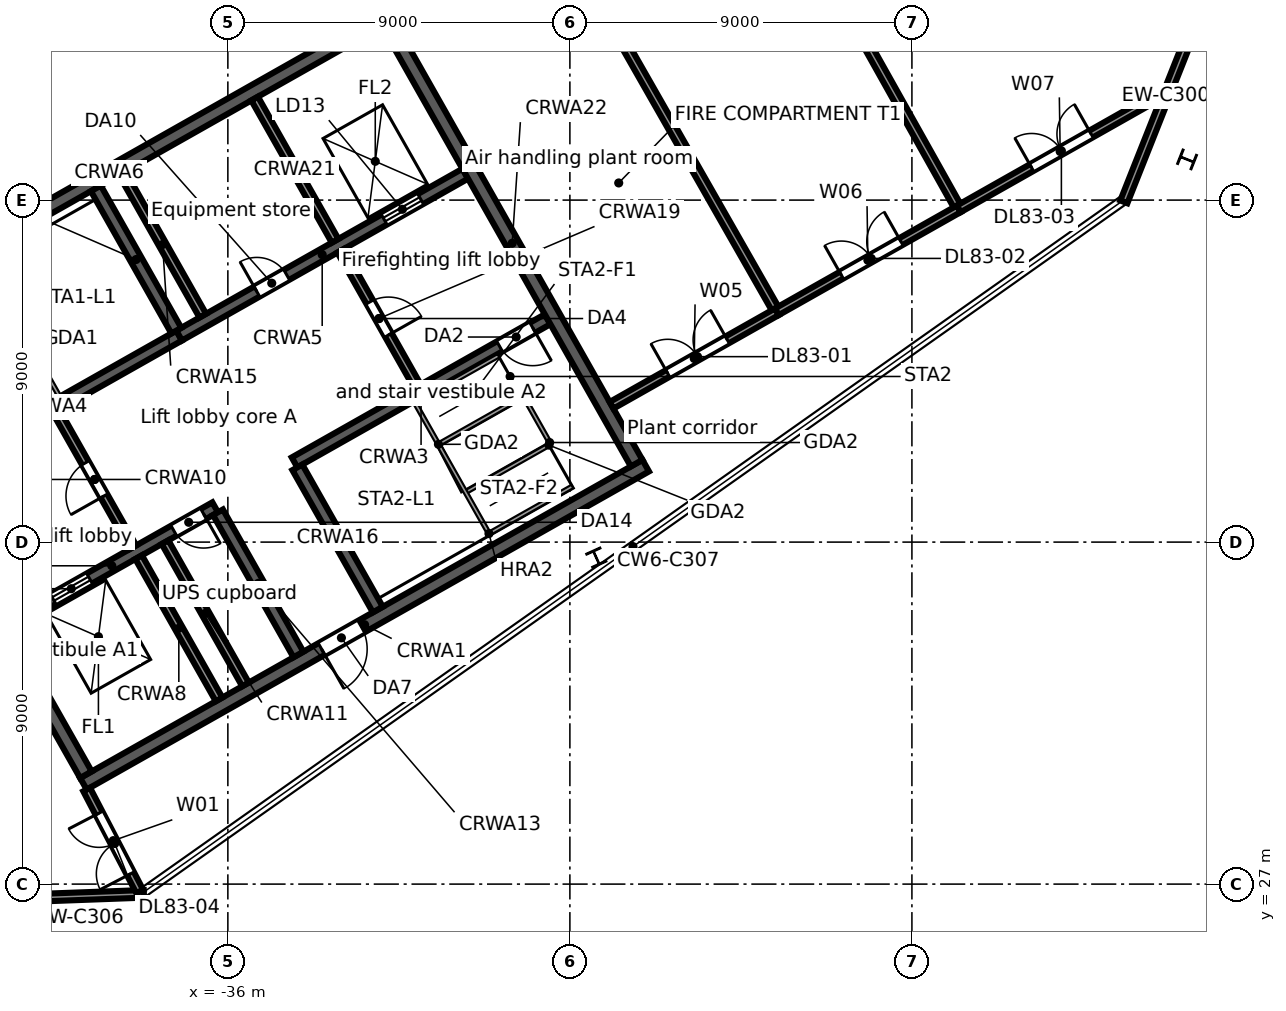
"""IFC4 building model, lengths in metres.
Left out: names, types, materials, properties, quantities, classifications, styles, units other than length and angle.
Written with IfcOpenShell. Run it as: python <this file> out.ifc"""

import sys

from ifc_helpers import new_model, si_unit, direction, frame, frame_2d, origin, origin_2d, place, context, subcontext, project, spatial, rectangle, i_section, extrude, element, fill, save


model = new_model("IFC4")
c1 = context("Model", 3, precision=1e-05, world=origin(), true_north=direction((0.0, 1.0)))
c2 = subcontext(c1, "Body", "Model", "MODEL_VIEW")
j1 = project(units=[si_unit("LENGTHUNIT", "METRE"), si_unit("PLANEANGLEUNIT", "RADIAN")], contexts=[c1])
p1 = place(None, origin())
s1 = spatial("IfcSite", under=j1, at=p1, CompositionType="ELEMENT")
p2 = place(p1, origin())
s2 = spatial("IfcBuilding", under=s1, at=p2, CompositionType="ELEMENT")
p3 = place(p2, frame((0.0, 0.0, 364.9)))
s3 = spatial("IfcBuildingStorey", under=s2, at=p3, CompositionType="ELEMENT", Elevation=364.9)
for number, where, z_axis, x_axis in (
    (1, (-10.76, 46.071, 0.0), (0.0, 0.0, 1.0), (0.369, 0.929, 0.0)),
    (2, (-26.305, 35.591, 0.0), (0.0, 0.0, 1.0), (0.911, 0.413, 0.0)),
):
    element("IfcColumn", number, at=place(p3, frame(where, z_axis=z_axis, x_axis=x_axis)), inside=s3, PredefinedType="COLUMN", context=c2, shape_type="SweptSolid", body=[
        extrude(i_section(OverallWidth=0.4, OverallDepth=0.4, WebThickness=0.013, FlangeThickness=0.021, FilletRadius=0.022, at=origin_2d()), origin(), (0.0, 0.0, 1.0), 3.6),
    ])
p4 = place(p3, frame((-10.22, 50.501, 0.0), z_axis=(0.0, 0.0, 1.0), x_axis=(-0.369026712049, -0.929418789241, 0.0)))
e3 = element("IfcWall", 3, at=p4, inside=s3, PredefinedType="STANDARD", context=c2, shape_type="SweptSolid", body=[
    extrude(rectangle(XDim=5.968, YDim=0.2, at=frame_2d((2.984, 0.0))), origin(), (0.0, 0.0, 1.0), 2.7),
])
p5 = place(p3, frame((-38.21, 26.744, 0.0), z_axis=(0.0, 0.0, 1.0), x_axis=(-0.999319030106, -0.036898185155, 0.0)))
e4 = element("IfcWall", 4, at=p5, inside=s3, PredefinedType="STANDARD", context=c2, shape_type="SweptSolid", body=[
    extrude(rectangle(XDim=5.968, YDim=0.2, at=frame_2d((2.984, 0.0))), origin(), (0.0, 0.0, 1.0), 3.3),
])
p6 = place(p3, frame((-39.801, 29.64, 0.0), z_axis=(0.0, 0.0, 1.0), x_axis=(0.870359753402, 0.492416388494, 0.0)))
e5 = element("IfcWall", 5, at=p6, inside=s3, PredefinedType="SOLIDWALL", context=c2, shape_type="SweptSolid", body=[
    extrude(rectangle(XDim=17.0, YDim=0.35, at=frame_2d((8.5, 0.0))), origin(), (0.0, 0.0, 1.0), 3.3),
])
p7 = place(p6, frame((7.2, 0.0, 0.0)))
e6 = element("IfcOpeningElement", 6, at=p7, cuts=e5, PredefinedType="OPENING", context=c2, shape_type="SweptSolid", body=[
    extrude(rectangle(XDim=1.2, YDim=2.1, at=frame_2d((0.6, 1.05))), frame((0.0, 0.185, 0.0), z_axis=(0.0, -1.0, 0.0), x_axis=(1.0, 0.0, 0.0)), (0.0, 0.0, 1.0), 0.37),
])
p8 = place(p3, frame((-41.774, 33.838, 0.0), z_axis=(0.0, 0.0, 1.0), x_axis=(0.870355415866, 0.492424055132, 0.0)))
e7 = element("IfcWall", 7, at=p8, inside=s3, PredefinedType="SOLIDWALL", context=c2, shape_type="SweptSolid", body=[
    extrude(rectangle(XDim=6.25, YDim=0.3, at=frame_2d((3.125, 0.0))), origin(), (0.0, 0.0, 1.0), 3.3),
])
p9 = place(p8, frame((1.35, 0.0, 0.0)))
e8 = element("IfcOpeningElement", 8, at=p9, cuts=e7, PredefinedType="OPENING", context=c2, shape_type="SweptSolid", body=[
    extrude(rectangle(XDim=1.1, YDim=2.1, at=frame_2d((0.55, 1.05))), frame((0.0, 0.16, 0.0), z_axis=(0.0, -1.0, 0.0), x_axis=(1.0, 0.0, 0.0)), (0.0, 0.0, 1.0), 0.32),
])
p10 = place(p8, frame((5.0, 0.0, 0.0)))
e9 = element("IfcOpeningElement", 9, at=p10, cuts=e7, PredefinedType="OPENING", context=c2, shape_type="SweptSolid", body=[
    extrude(rectangle(XDim=0.9, YDim=2.1, at=frame_2d((0.45, 1.05))), frame((0.0, 0.16, 0.0), z_axis=(0.0, -1.0, 0.0), x_axis=(1.0, 0.0, 0.0)), (0.0, 0.0, 1.0), 0.32),
])
p11 = place(p3, frame((-34.245, 38.097, 0.0), z_axis=(0.0, 0.0, 1.0), x_axis=(0.870352347706, 0.49242947804, 0.0)))
e10 = element("IfcWall", 10, at=p11, inside=s3, PredefinedType="SOLIDWALL", context=c2, shape_type="SweptSolid", body=[
    extrude(rectangle(XDim=7.65, YDim=0.3, at=frame_2d((3.825, 0.0))), origin(), (0.0, 0.0, 1.0), 3.3),
])
p12 = place(p11, frame((6.2, 0.0, 0.0)))
e11 = element("IfcOpeningElement", 11, at=p12, cuts=e10, PredefinedType="OPENING", context=c2, shape_type="SweptSolid", body=[
    extrude(rectangle(XDim=1.0, YDim=2.1, at=frame_2d((0.5, 1.05))), frame((0.0, 0.16, 0.0), z_axis=(0.0, -1.0, 0.0), x_axis=(1.0, 0.0, 0.0)), (0.0, 0.0, 1.0), 0.32),
])
p13 = place(p3, frame((-43.94, 37.667, 0.0), z_axis=(0.0, 0.0, 1.0), x_axis=(0.870352347706, 0.49242947804, 0.0)))
e12 = element("IfcWall", 12, at=p13, inside=s3, PredefinedType="SOLIDWALL", context=c2, shape_type="SweptSolid", body=[
    extrude(rectangle(XDim=7.65, YDim=0.3, at=frame_2d((3.825, 0.0))), origin(), (0.0, 0.0, 1.0), 3.3),
])
p14 = place(p13, frame((0.45, 0.0, 0.0)))
e13 = element("IfcOpeningElement", 13, at=p14, cuts=e12, PredefinedType="OPENING", context=c2, shape_type="SweptSolid", body=[
    extrude(rectangle(XDim=1.0, YDim=2.1, at=frame_2d((0.5, 1.05))), frame((0.0, 0.16, 0.0), z_axis=(0.0, -1.0, 0.0), x_axis=(1.0, 0.0, 0.0)), (0.0, 0.0, 1.0), 0.32),
])
p15 = place(p3, frame((-37.282, 41.435, 0.0), z_axis=(0.0, 0.0, 1.0), x_axis=(0.870364588774, 0.492407841741, 0.0)))
e14 = element("IfcWall", 14, at=p15, inside=s3, PredefinedType="SOLIDWALL", context=c2, shape_type="SweptSolid", body=[
    extrude(rectangle(XDim=8.65, YDim=0.3, at=frame_2d((4.325, 0.0))), origin(), (0.0, 0.0, 1.0), 3.3),
])
p16 = place(p15, frame((6.2, 0.0, 0.0)))
e15 = element("IfcOpeningElement", 15, at=p16, cuts=e14, PredefinedType="OPENING", context=c2, shape_type="SweptSolid", body=[
    extrude(rectangle(XDim=1.1, YDim=2.1, at=frame_2d((0.55, 1.05))), frame((0.0, 0.16, 0.0), z_axis=(0.0, -1.0, 0.0), x_axis=(1.0, 0.0, 0.0)), (0.0, 0.0, 1.0), 0.32),
])
p17 = place(p15, frame((2.35, 0.0, 0.0)))
e16 = element("IfcOpeningElement", 16, at=p17, cuts=e14, PredefinedType="OPENING", context=c2, shape_type="SweptSolid", body=[
    extrude(rectangle(XDim=0.9, YDim=2.1, at=frame_2d((0.45, 1.05))), frame((0.0, 0.16, 0.0), z_axis=(0.0, -1.0, 0.0), x_axis=(1.0, 0.0, 0.0)), (0.0, 0.0, 1.0), 0.32),
])
p18 = place(p3, frame((-46.522, 41.521, 0.0), z_axis=(0.0, 0.0, 1.0), x_axis=(0.870359753402, 0.492416388494, 0.0)))
e17 = element("IfcWall", 17, at=p18, inside=s3, PredefinedType="SOLIDWALL", context=c2, shape_type="SweptSolid", body=[
    extrude(rectangle(XDim=17.0, YDim=0.35, at=frame_2d((8.5, 0.0))), origin(), (0.0, 0.0, 1.0), 3.3),
])
p19 = place(p3, frame((-46.284, 41.454, 0.0), z_axis=(0.0, 0.0, 1.0), x_axis=(0.492429810477, -0.870352159619, 0.0)))
e18 = element("IfcWall", 18, at=p19, inside=s3, PredefinedType="SOLIDWALL", context=c2, shape_type="SweptSolid", body=[
    extrude(rectangle(XDim=13.3, YDim=0.35, at=frame_2d((6.65, 0.0))), origin(), (0.0, 0.0, 1.0), 3.3),
])
p20 = place(p3, frame((-38.349, 35.603, 0.0), z_axis=(0.0, 0.0, 1.0), x_axis=(0.492410799949, -0.870362915164, 0.0)))
e19 = element("IfcWall", 19, at=p20, inside=s3, PredefinedType="SOLIDWALL", context=c2, shape_type="SweptSolid", body=[
    extrude(rectangle(XDim=4.3, YDim=0.2, at=frame_2d((2.15, 0.0))), origin(), (0.0, 0.0, 1.0), 3.3),
])
p21 = place(p3, frame((-40.516, 39.433, 0.0), z_axis=(0.0, 0.0, 1.0), x_axis=(0.492453559952, -0.87033872216, 0.0)))
e20 = element("IfcWall", 20, at=p21, inside=s3, PredefinedType="PARTITIONING", context=c2, shape_type="SweptSolid", body=[
    extrude(rectangle(XDim=4.1, YDim=0.2, at=frame_2d((2.05, 0.0))), origin(), (0.0, 0.0, 1.0), 3.3),
])
p22 = place(p21, frame((1.55, 0.0, 0.0)))
e21 = element("IfcOpeningElement", 21, at=p22, cuts=e20, PredefinedType="OPENING", context=c2, shape_type="SweptSolid", body=[
    extrude(rectangle(XDim=1.0, YDim=2.1, at=frame_2d((0.5, 1.05))), frame((0.0, 0.11, 0.0), z_axis=(0.0, -1.0, 0.0), x_axis=(1.0, 0.0, 0.0)), (0.0, 0.0, 1.0), 0.22),
])
p23 = place(p3, frame((-37.653, 35.997, 0.0), z_axis=(0.0, 0.0, 1.0), x_axis=(0.492435133428, -0.870349147967, 0.0)))
e22 = element("IfcWall", 22, at=p23, inside=s3, PredefinedType="SOLIDWALL", context=c2, shape_type="SweptSolid", body=[
    extrude(rectangle(XDim=4.3, YDim=0.2, at=frame_2d((2.15, 0.0))), origin(), (0.0, 0.0, 1.0), 3.3),
])
p24 = place(p3, frame((-36.26, 36.785, 0.0), z_axis=(0.0, 0.0, 1.0), x_axis=(0.492435133428, -0.870349147967, 0.0)))
e23 = element("IfcWall", 23, at=p24, inside=s3, PredefinedType="SOLIDWALL", context=c2, shape_type="SweptSolid", body=[
    extrude(rectangle(XDim=4.3, YDim=0.3, at=frame_2d((2.15, 0.0))), origin(), (0.0, 0.0, 1.0), 3.3),
])
p25 = place(p3, frame((-39.473, 45.308, 0.0), z_axis=(0.0, 0.0, 1.0), x_axis=(0.492410799949, -0.870362915164, 0.0)))
e24 = element("IfcWall", 24, at=p25, inside=s3, PredefinedType="SOLIDWALL", context=c2, shape_type="SweptSolid", body=[
    extrude(rectangle(XDim=4.3, YDim=0.3, at=frame_2d((2.15, 0.0))), origin(), (0.0, 0.0, 1.0), 3.3),
])
p26 = place(p3, frame((-38.777, 45.701, 0.0), z_axis=(0.0, 0.0, 1.0), x_axis=(0.492435133428, -0.870349147967, 0.0)))
e25 = element("IfcWall", 25, at=p26, inside=s3, PredefinedType="SOLIDWALL", context=c2, shape_type="SweptSolid", body=[
    extrude(rectangle(XDim=4.3, YDim=0.2, at=frame_2d((2.15, 0.0))), origin(), (0.0, 0.0, 1.0), 3.3),
])
p27 = place(p3, frame((-34.171, 37.967, 0.0), z_axis=(0.0, 0.0, 1.0), x_axis=(0.492435133428, -0.870349147967, 0.0)))
e26 = element("IfcWall", 26, at=p27, inside=s3, PredefinedType="SOLIDWALL", context=c2, shape_type="SweptSolid", body=[
    extrude(rectangle(XDim=4.3, YDim=0.3, at=frame_2d((2.15, 0.0))), origin(), (0.0, 0.0, 1.0), 3.3),
])
p28 = place(p3, frame((-33.031, 43.667, 0.0), z_axis=(0.0, 0.0, 1.0), x_axis=(0.492408451753, -0.87036424366, 0.0)))
e27 = element("IfcWall", 27, at=p28, inside=s3, PredefinedType="PARTITIONING", context=c2, shape_type="SweptSolid", body=[
    extrude(rectangle(XDim=4.1, YDim=0.2, at=frame_2d((2.05, 0.0))), origin(), (0.0, 0.0, 1.0), 3.3),
])
p29 = place(p28, frame((1.55, 0.0, 0.0)))
e28 = element("IfcOpeningElement", 28, at=p29, cuts=e27, PredefinedType="OPENING", context=c2, shape_type="SweptSolid", body=[
    extrude(rectangle(XDim=1.0, YDim=2.1, at=frame_2d((0.5, 1.05))), frame((0.0, 0.11, 0.0), z_axis=(0.0, -1.0, 0.0), x_axis=(1.0, 0.0, 0.0)), (0.0, 0.0, 1.0), 0.22),
])
p30 = place(p3, frame((-35.296, 47.671, 0.0), z_axis=(0.0, 0.0, 1.0), x_axis=(0.492435133428, -0.870349147967, 0.0)))
e29 = element("IfcWall", 29, at=p30, inside=s3, PredefinedType="SOLIDWALL", context=c2, shape_type="SweptSolid", body=[
    extrude(rectangle(XDim=4.3, YDim=0.2, at=frame_2d((2.15, 0.0))), origin(), (0.0, 0.0, 1.0), 3.3),
])
p31 = place(p3, frame((-31.792, 49.653, 0.0), z_axis=(0.0, 0.0, 1.0), x_axis=(0.492421943245, -0.870356610712, 0.0)))
e30 = element("IfcWall", 30, at=p31, inside=s3, PredefinedType="SOLIDWALL", context=c2, shape_type="SweptSolid", body=[
    extrude(rectangle(XDim=13.3, YDim=0.35, at=frame_2d((6.65, 0.0))), origin(), (0.0, 0.0, 1.0), 3.3),
])
p32 = place(p3, frame((-39.715, 29.488, 0.0), z_axis=(0.0, 0.0, 1.0), x_axis=(0.461720517785, -0.887025458178, 0.0)))
e31 = element("IfcWall", 31, at=p32, inside=s3, PredefinedType="PARTITIONING", context=c2, shape_type="SweptSolid", body=[
    extrude(rectangle(XDim=3.03, YDim=0.2, at=frame_2d((1.515, 0.0))), origin(), (0.0, 0.0, 1.0), 3.3),
])
p33 = place(p32, frame((0.7, 0.0, 0.0)))
e32 = element("IfcOpeningElement", 32, at=p33, cuts=e31, PredefinedType="OPENING", context=c2, shape_type="SweptSolid", body=[
    extrude(rectangle(XDim=1.8, YDim=2.1, at=frame_2d((0.9, 1.05))), frame((0.0, 0.11, 0.0), z_axis=(0.0, -1.0, 0.0), x_axis=(1.0, 0.0, 0.0)), (0.0, 0.0, 1.0), 0.22),
])
p34 = place(p3, frame((-31.031, 58.679, 0.0), z_axis=(0.0, 0.0, 1.0), x_axis=(0.495492853456, -0.868612014753, 0.0)))
e33 = element("IfcWall", 33, at=p34, inside=s3, PredefinedType="PARTITIONING", context=c2, shape_type="SweptSolid", body=[
    extrude(rectangle(XDim=19.13, YDim=0.2, at=frame_2d((9.565, 0.0))), origin(), (0.0, 0.0, 1.0), 2.68),
])
p35 = place(p3, frame((-26.399, 61.95, 0.0), z_axis=(0.0, 0.0, 1.0), x_axis=(0.489116217078, -0.872218622933, 0.0)))
e34 = element("IfcWall", 34, at=p35, inside=s3, PredefinedType="PARTITIONING", context=c2, shape_type="SweptSolid", body=[
    extrude(rectangle(XDim=19.697, YDim=0.2, at=frame_2d((9.848, 0.0))), origin(), (0.0, 0.0, 1.0), 2.68),
])
p36 = place(p3, frame((-25.904, 39.6, 0.0), z_axis=(0.0, 0.0, 1.0), x_axis=(0.870386362759, 0.492369352746, 0.0)))
e35 = element("IfcWall", 35, at=p36, inside=s3, PredefinedType="PARTITIONING", context=c2, shape_type="SweptSolid", body=[
    extrude(rectangle(XDim=5.0, YDim=0.2, at=frame_2d((2.5, 0.0))), origin(), (0.0, 0.0, 1.0), 3.3),
])
p37 = place(p36, frame((1.7, 0.0, 0.0)))
e36 = element("IfcOpeningElement", 36, at=p37, cuts=e35, PredefinedType="OPENING", context=c2, shape_type="SweptSolid", body=[
    extrude(rectangle(XDim=1.8, YDim=2.1, at=frame_2d((0.9, 1.05))), frame((0.0, 0.11, 0.0), z_axis=(0.0, -1.0, 0.0), x_axis=(1.0, 0.0, 0.0)), (0.0, 0.0, 1.0), 0.22),
])
p38 = place(p3, frame((-21.552, 42.062, 0.0), z_axis=(0.0, 0.0, 1.0), x_axis=(0.870387515286, 0.492367315359, 0.0)))
e37 = element("IfcWall", 37, at=p38, inside=s3, PredefinedType="PARTITIONING", context=c2, shape_type="SweptSolid", body=[
    extrude(rectangle(XDim=5.5, YDim=0.2, at=frame_2d((2.75, 0.0))), origin(), (0.0, 0.0, 1.0), 3.3),
])
p39 = place(p38, frame((1.95, 0.0, 0.0)))
e38 = element("IfcOpeningElement", 38, at=p39, cuts=e37, PredefinedType="OPENING", context=c2, shape_type="SweptSolid", body=[
    extrude(rectangle(XDim=1.8, YDim=2.1, at=frame_2d((0.9, 1.05))), frame((0.0, 0.11, 0.0), z_axis=(0.0, -1.0, 0.0), x_axis=(1.0, 0.0, 0.0)), (0.0, 0.0, 1.0), 0.22),
])
p40 = place(p3, frame((-16.765, 44.77, 0.0), z_axis=(0.0, 0.0, 1.0), x_axis=(0.870320026037, 0.492486601116, 0.0)))
e39 = element("IfcWall", 39, at=p40, inside=s3, PredefinedType="PARTITIONING", context=c2, shape_type="SweptSolid", body=[
    extrude(rectangle(XDim=6.126, YDim=0.2, at=frame_2d((3.063, 0.0))), origin(), (0.0, 0.0, 1.0), 3.3),
])
p41 = place(p40, frame((2.2, 0.0, 0.0)))
e40 = element("IfcOpeningElement", 40, at=p41, cuts=e39, PredefinedType="OPENING", context=c2, shape_type="SweptSolid", body=[
    extrude(rectangle(XDim=1.8, YDim=2.1, at=frame_2d((0.9, 1.05))), frame((0.0, 0.11, 0.0), z_axis=(0.0, -1.0, 0.0), x_axis=(1.0, 0.0, 0.0)), (0.0, 0.0, 1.0), 0.22),
])
p42 = place(p16, origin())
e41 = element("IfcDoor", 41, at=p42, inside=s3, OperationType="DOUBLE_DOOR_SLIDING", PredefinedType="DOOR", context=c2, shape_type="SweptSolid", body=[
    extrude(rectangle(XDim=1.1, YDim=2.1, at=frame_2d((0.55, 1.05))), frame((0.0, 0.025, 0.0), z_axis=(0.0, -1.0, 0.0), x_axis=(1.0, 0.0, 0.0)), (0.0, 0.0, 1.0), 0.05),
])
fill(e15, e41)
p43 = place(p9, origin())
e42 = element("IfcDoor", 42, at=p43, inside=s3, OperationType="DOUBLE_DOOR_SLIDING", PredefinedType="DOOR", context=c2, shape_type="SweptSolid", body=[
    extrude(rectangle(XDim=1.1, YDim=2.1, at=frame_2d((0.55, 1.05))), frame((0.0, 0.025, 0.0), z_axis=(0.0, -1.0, 0.0), x_axis=(1.0, 0.0, 0.0)), (0.0, 0.0, 1.0), 0.05),
])
fill(e8, e42)
p44 = place(p12, frame((1.0, 0.0, 0.0), z_axis=(0.0, 0.0, 1.0), x_axis=(-1.0, 0.0, 0.0)))
e43 = element("IfcDoor", 43, at=p44, inside=s3, OperationType="SINGLE_SWING_LEFT", PredefinedType="DOOR", context=c2, shape_type="SweptSolid", body=[
    extrude(rectangle(XDim=1.0, YDim=2.1, at=frame_2d((0.5, 1.05))), frame((0.0, 0.025, 0.0), z_axis=(0.0, -1.0, 0.0), x_axis=(1.0, 0.0, 0.0)), (0.0, 0.0, 1.0), 0.05),
])
fill(e11, e43)
p45 = place(p22, frame((1.0, 0.0, 0.0), z_axis=(0.0, 0.0, 1.0), x_axis=(-1.0, 0.0, 0.0)))
e44 = element("IfcDoor", 44, at=p45, inside=s3, OperationType="SINGLE_SWING_LEFT", PredefinedType="DOOR", context=c2, shape_type="SweptSolid", body=[
    extrude(rectangle(XDim=1.0, YDim=2.1, at=frame_2d((0.5, 1.05))), frame((0.0, 0.025, 0.0), z_axis=(0.0, -1.0, 0.0), x_axis=(1.0, 0.0, 0.0)), (0.0, 0.0, 1.0), 0.05),
])
fill(e21, e44)
p46 = place(p29, origin())
e45 = element("IfcDoor", 45, at=p46, inside=s3, OperationType="SINGLE_SWING_RIGHT", PredefinedType="DOOR", context=c2, shape_type="SweptSolid", body=[
    extrude(rectangle(XDim=1.0, YDim=2.1, at=frame_2d((0.5, 1.05))), frame((0.0, 0.025, 0.0), z_axis=(0.0, -1.0, 0.0), x_axis=(1.0, 0.0, 0.0)), (0.0, 0.0, 1.0), 0.05),
])
fill(e28, e45)
p47 = place(p7, frame((1.2, 0.0, 0.0), z_axis=(0.0, 0.0, 1.0), x_axis=(-1.0, 0.0, 0.0)))
e46 = element("IfcDoor", 46, at=p47, inside=s3, OperationType="SINGLE_SWING_RIGHT", PredefinedType="DOOR", context=c2, shape_type="SweptSolid", body=[
    extrude(rectangle(XDim=1.2, YDim=2.1, at=frame_2d((0.6, 1.05))), frame((0.0, 0.025, 0.0), z_axis=(0.0, -1.0, 0.0), x_axis=(1.0, 0.0, 0.0)), (0.0, 0.0, 1.0), 0.05),
])
fill(e6, e46)
p48 = place(p17, origin())
e47 = element("IfcDoor", 47, at=p48, inside=s3, OperationType="SINGLE_SWING_LEFT", PredefinedType="DOOR", context=c2, shape_type="SweptSolid", body=[
    extrude(rectangle(XDim=0.9, YDim=2.1, at=frame_2d((0.45, 1.05))), frame((0.0, 0.025, 0.0), z_axis=(0.0, -1.0, 0.0), x_axis=(1.0, 0.0, 0.0)), (0.0, 0.0, 1.0), 0.05),
])
fill(e16, e47)
p49 = place(p10, frame((0.9, 0.0, 0.0), z_axis=(0.0, 0.0, 1.0), x_axis=(-1.0, 0.0, 0.0)))
e48 = element("IfcDoor", 48, at=p49, inside=s3, OperationType="SINGLE_SWING_LEFT", PredefinedType="DOOR", context=c2, shape_type="SweptSolid", body=[
    extrude(rectangle(XDim=0.9, YDim=2.1, at=frame_2d((0.45, 1.05))), frame((0.0, 0.025, 0.0), z_axis=(0.0, -1.0, 0.0), x_axis=(1.0, 0.0, 0.0)), (0.0, 0.0, 1.0), 0.05),
])
fill(e9, e48)
p50 = place(p37, origin())
e49 = element("IfcDoor", 49, at=p50, inside=s3, OperationType="DOUBLE_DOOR_SINGLE_SWING", PredefinedType="DOOR", context=c2, shape_type="SweptSolid", body=[
    extrude(rectangle(XDim=1.8, YDim=2.1, at=frame_2d((0.9, 1.05))), frame((0.0, 0.025, 0.0), z_axis=(0.0, -1.0, 0.0), x_axis=(1.0, 0.0, 0.0)), (0.0, 0.0, 1.0), 0.05),
])
fill(e36, e49)
p51 = place(p39, origin())
e50 = element("IfcDoor", 50, at=p51, inside=s3, OperationType="DOUBLE_DOOR_SINGLE_SWING", PredefinedType="DOOR", context=c2, shape_type="SweptSolid", body=[
    extrude(rectangle(XDim=1.8, YDim=2.1, at=frame_2d((0.9, 1.05))), frame((0.0, 0.025, 0.0), z_axis=(0.0, -1.0, 0.0), x_axis=(1.0, 0.0, 0.0)), (0.0, 0.0, 1.0), 0.05),
])
fill(e38, e50)
p52 = place(p41, origin())
e51 = element("IfcDoor", 51, at=p52, inside=s3, OperationType="DOUBLE_DOOR_SINGLE_SWING", PredefinedType="DOOR", context=c2, shape_type="SweptSolid", body=[
    extrude(rectangle(XDim=1.8, YDim=2.1, at=frame_2d((0.9, 1.05))), frame((0.0, 0.025, 0.0), z_axis=(0.0, -1.0, 0.0), x_axis=(1.0, 0.0, 0.0)), (0.0, 0.0, 1.0), 0.05),
])
fill(e40, e51)
p53 = place(p33, frame((1.8, 0.0, 0.0), z_axis=(0.0, 0.0, 1.0), x_axis=(-1.0, 0.0, 0.0)))
e52 = element("IfcDoor", 52, at=p53, inside=s3, OperationType="DOUBLE_DOOR_SINGLE_SWING", PredefinedType="DOOR", context=c2, shape_type="SweptSolid", body=[
    extrude(rectangle(XDim=1.8, YDim=2.1, at=frame_2d((0.9, 1.05))), frame((0.0, 0.025, 0.0), z_axis=(0.0, -1.0, 0.0), x_axis=(1.0, 0.0, 0.0)), (0.0, 0.0, 1.0), 0.05),
])
fill(e32, e52)
save(model, sys.argv[1])
